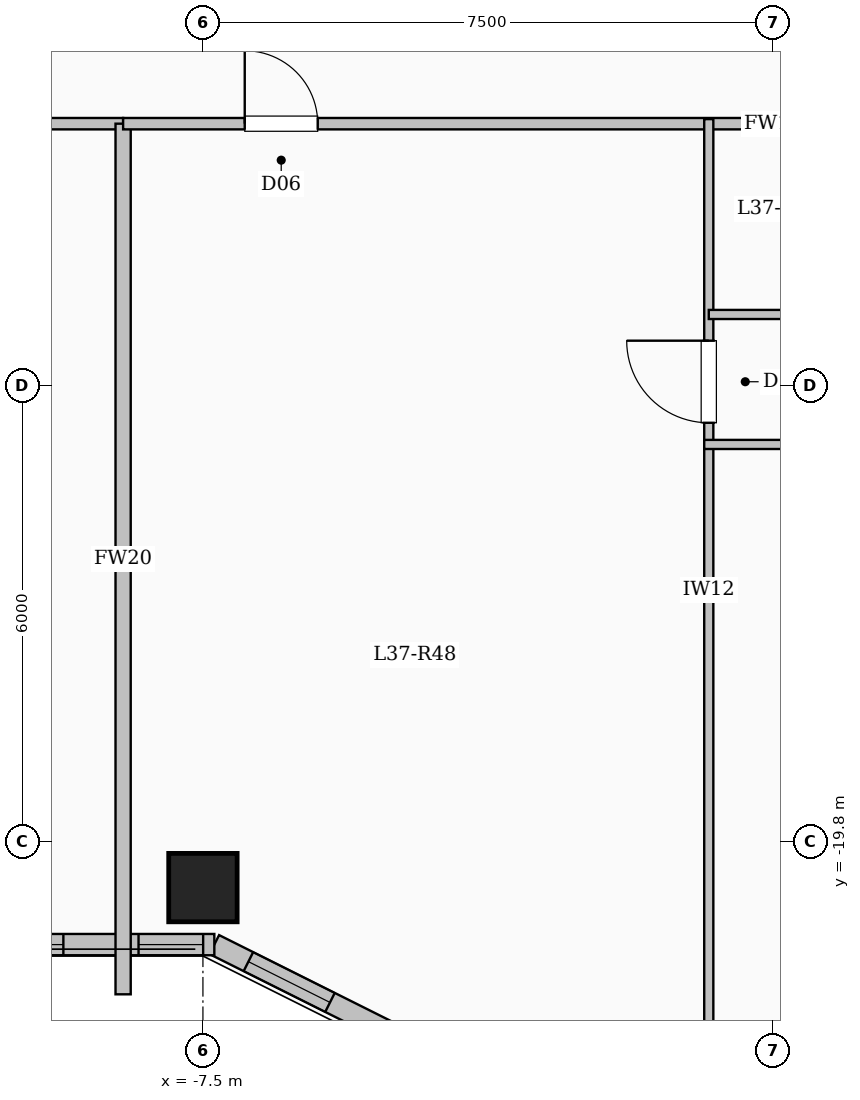
"""IFC4 building model, lengths in metres.
Left out: names, types, materials, properties, quantities, classifications, styles, units other than length and angle.
Written with IfcOpenShell. Run it as: python <this file> out.ifc"""

import sys

from ifc_helpers import new_model, si_unit, direction, frame, frame_2d, origin, origin_2d, place, context, subcontext, project, spatial, rectangle, extrude, element, fill, save


model = new_model("IFC4")
c1 = context("Model", 3, precision=1e-05, world=origin(), true_north=direction((0.0, 1.0)))
c2 = subcontext(c1, "Body", "Model", "MODEL_VIEW")
j1 = project(units=[si_unit("LENGTHUNIT", "METRE"), si_unit("PLANEANGLEUNIT", "RADIAN")], contexts=[c1])
p1 = place(None, origin())
s1 = spatial("IfcSite", under=j1, at=p1, CompositionType="ELEMENT")
p2 = place(p1, origin())
s2 = spatial("IfcBuilding", under=s1, at=p2, CompositionType="ELEMENT")
p3 = place(p2, frame((0.0, 0.0, 139.3)))
s3 = spatial("IfcBuildingStorey", under=s2, at=p3, CompositionType="ELEMENT", Elevation=139.3)
p4 = place(p3, frame((-7.5, -20.4, 0.0), z_axis=(0.0, 0.0, 1.0), x_axis=(1.0, 0.0, 0.0)))
e1 = element("IfcColumn", 1, at=p4, inside=s3, PredefinedType="COLUMN", context=c2, shape_type="SweptSolid", body=[
    extrude(rectangle(XDim=0.9, YDim=0.9, at=origin_2d()), origin(), (0.0, 0.0, 1.0), 3.35),
])
p5 = place(p3, frame((-4.35, -22.65, 0.0), z_axis=(0.0, 0.0, 1.0), x_axis=(-0.894427191, 0.4472135955, 0.0)))
e2 = element("IfcWall", 2, at=p5, inside=s3, PredefinedType="SOLIDWALL", context=c2, shape_type="SweptSolid", body=[
    extrude(rectangle(XDim=3.354, YDim=0.28, at=frame_2d((1.677, 0.0))), origin(), (0.0, 0.0, 1.0), 3.1),
])
p6 = place(p5, frame((1.653, 0.0, 0.95)))
e3 = element("IfcOpeningElement", 3, at=p6, cuts=e2, PredefinedType="OPENING", context=c2, shape_type="SweptSolid", body=[
    extrude(rectangle(XDim=1.2, YDim=1.5, at=frame_2d((0.6, 0.75))), frame((0.0, 0.15, 0.0), z_axis=(0.0, -1.0, 0.0), x_axis=(1.0, 0.0, 0.0)), (0.0, 0.0, 1.0), 0.3),
])
p7 = place(p3, frame((-7.35, -21.15, 0.0), z_axis=(0.0, 0.0, 1.0), x_axis=(-1.0, 0.0, 0.0)))
e4 = element("IfcWall", 4, at=p7, inside=s3, PredefinedType="SOLIDWALL", context=c2, shape_type="SweptSolid", body=[
    extrude(rectangle(XDim=12.3, YDim=0.28, at=frame_2d((6.15, 0.0))), origin(), (0.0, 0.0, 1.0), 3.1),
])
p8 = place(p7, frame((0.147, 0.0, 0.95)))
e5 = element("IfcOpeningElement", 5, at=p8, cuts=e4, PredefinedType="OPENING", context=c2, shape_type="SweptSolid", body=[
    extrude(rectangle(XDim=0.85, YDim=1.5, at=frame_2d((0.425, 0.75))), frame((0.0, 0.15, 0.0), z_axis=(0.0, -1.0, 0.0), x_axis=(1.0, 0.0, 0.0)), (0.0, 0.0, 1.0), 0.3),
])
p9 = place(p7, frame((1.986, 0.0, 0.9)))
e6 = element("IfcOpeningElement", 6, at=p9, cuts=e4, PredefinedType="OPENING", context=c2, shape_type="SweptSolid", body=[
    extrude(rectangle(XDim=1.5, YDim=1.65, at=frame_2d((0.75, 0.825))), frame((0.0, 0.15, 0.0), z_axis=(0.0, -1.0, 0.0), x_axis=(1.0, 0.0, 0.0)), (0.0, 0.0, 1.0), 0.3),
])
p10 = place(p7, frame((5.275, 0.0, 0.9)))
e7 = element("IfcOpeningElement", 7, at=p10, cuts=e4, PredefinedType="OPENING", context=c2, shape_type="SweptSolid", body=[
    extrude(rectangle(XDim=2.0, YDim=1.7, at=frame_2d((1.0, 0.85))), frame((0.0, 0.15, 0.0), z_axis=(0.0, -1.0, 0.0), x_axis=(1.0, 0.0, 0.0)), (0.0, 0.0, 1.0), 0.3),
])
p11 = place(p7, frame((9.267, 0.0, 0.9)))
e8 = element("IfcOpeningElement", 8, at=p11, cuts=e4, PredefinedType="OPENING", context=c2, shape_type="SweptSolid", body=[
    extrude(rectangle(XDim=2.0, YDim=1.7, at=frame_2d((1.0, 0.85))), frame((0.0, 0.15, 0.0), z_axis=(0.0, -1.0, 0.0), x_axis=(1.0, 0.0, 0.0)), (0.0, 0.0, 1.0), 0.3),
])
p12 = place(p3, frame((-19.55, -10.35, 0.0), z_axis=(0.0, 0.0, 1.0), x_axis=(1.0, 0.0, 0.0)))
e9 = element("IfcWall", 9, at=p12, inside=s3, PredefinedType="PARTITIONING", context=c2, shape_type="SweptSolid", body=[
    extrude(rectangle(XDim=11.0, YDim=0.15, at=frame_2d((5.5, 0.0))), origin(), (0.0, 0.0, 1.0), 3.1),
])
p13 = place(p12, frame((1.466, 0.0, 0.0)))
e10 = element("IfcOpeningElement", 10, at=p13, cuts=e9, PredefinedType="OPENING", context=c2, shape_type="SweptSolid", body=[
    extrude(rectangle(XDim=0.95, YDim=2.15, at=frame_2d((0.475, 1.075))), frame((0.0, 0.085, 0.0), z_axis=(0.0, -1.0, 0.0), x_axis=(1.0, 0.0, 0.0)), (0.0, 0.0, 1.0), 0.17),
])
p14 = place(p12, frame((5.438, 0.0, 0.0)))
e11 = element("IfcOpeningElement", 11, at=p14, cuts=e9, PredefinedType="OPENING", context=c2, shape_type="SweptSolid", body=[
    extrude(rectangle(XDim=0.95, YDim=2.15, at=frame_2d((0.475, 1.075))), frame((0.0, 0.085, 0.0), z_axis=(0.0, -1.0, 0.0), x_axis=(1.0, 0.0, 0.0)), (0.0, 0.0, 1.0), 0.17),
])
p15 = place(p12, frame((8.972, 0.0, 0.0)))
e12 = element("IfcOpeningElement", 12, at=p15, cuts=e9, PredefinedType="OPENING", context=c2, shape_type="SweptSolid", body=[
    extrude(rectangle(XDim=0.95, YDim=2.15, at=frame_2d((0.475, 1.075))), frame((0.0, 0.085, 0.0), z_axis=(0.0, -1.0, 0.0), x_axis=(1.0, 0.0, 0.0)), (0.0, 0.0, 1.0), 0.17),
])
p16 = place(p3, frame((-8.55, -21.804, 0.0), z_axis=(0.0, 0.0, 1.0), x_axis=(0.0, 1.0, 0.0)))
e13 = element("IfcWall", 13, at=p16, inside=s3, PredefinedType="SOLIDWALL", context=c2, shape_type="SweptSolid", body=[
    extrude(rectangle(XDim=11.454, YDim=0.2, at=frame_2d((5.727, 0.0))), origin(), (0.0, 0.0, 1.0), 3.1),
])
p17 = place(p3, frame((-8.55, -10.35, 0.0), z_axis=(0.0, 0.0, 1.0), x_axis=(1.0, 0.0, 0.0)))
e14 = element("IfcWall", 14, at=p17, inside=s3, PredefinedType="PARTITIONING", context=c2, shape_type="SweptSolid", body=[
    extrude(rectangle(XDim=17.1, YDim=0.15, at=frame_2d((8.55, 0.0))), origin(), (0.0, 0.0, 1.0), 3.1),
])
p18 = place(p17, frame((1.6, 0.0, 0.0)))
e15 = element("IfcOpeningElement", 15, at=p18, cuts=e14, PredefinedType="OPENING", context=c2, shape_type="SweptSolid", body=[
    extrude(rectangle(XDim=0.96, YDim=2.15, at=frame_2d((0.48, 1.075))), frame((0.0, 0.085, 0.0), z_axis=(0.0, -1.0, 0.0), x_axis=(1.0, 0.0, 0.0)), (0.0, 0.0, 1.0), 0.17),
])
p19 = place(p3, frame((-0.845, -22.68, 0.0), z_axis=(0.0, 0.0, 1.0), x_axis=(0.0, 1.0, 0.0)))
e16 = element("IfcWall", 16, at=p19, inside=s3, PredefinedType="PARTITIONING", context=c2, shape_type="SweptSolid", body=[
    extrude(rectangle(XDim=12.39, YDim=0.12, at=frame_2d((6.195, 0.0))), origin(), (0.0, 0.0, 1.0), 3.1),
])
p20 = place(p19, frame((8.395, 0.0, 0.0)))
e17 = element("IfcOpeningElement", 17, at=p20, cuts=e16, PredefinedType="OPENING", context=c2, shape_type="SweptSolid", body=[
    extrude(rectangle(XDim=1.08, YDim=2.15, at=frame_2d((0.54, 1.075))), frame((0.0, 0.07, 0.0), z_axis=(0.0, -1.0, 0.0), x_axis=(1.0, 0.0, 0.0)), (0.0, 0.0, 1.0), 0.14),
])
p21 = place(p3, frame((-0.845, -12.86, 0.0), z_axis=(0.0, 0.0, 1.0), x_axis=(1.0, 0.0, 0.0)))
e18 = element("IfcWall", 18, at=p21, inside=s3, PredefinedType="PARTITIONING", context=c2, shape_type="SweptSolid", body=[
    extrude(rectangle(XDim=4.942, YDim=0.12, at=frame_2d((2.471, 0.0))), origin(), (0.0, 0.0, 1.0), 3.1),
])
p22 = place(p21, frame((2.031, 0.0, 0.0)))
e19 = element("IfcOpeningElement", 19, at=p22, cuts=e18, PredefinedType="OPENING", context=c2, shape_type="SweptSolid", body=[
    extrude(rectangle(XDim=0.88, YDim=2.1, at=frame_2d((0.44, 1.05))), frame((0.0, 0.07, 0.0), z_axis=(0.0, -1.0, 0.0), x_axis=(1.0, 0.0, 0.0)), (0.0, 0.0, 1.0), 0.14),
])
p23 = place(p3, frame((-0.905, -14.57, 0.0), z_axis=(0.0, 0.0, 1.0), x_axis=(1.0, 0.0, 0.0)))
e20 = element("IfcWall", 20, at=p23, inside=s3, PredefinedType="PARTITIONING", context=c2, shape_type="SweptSolid", body=[
    extrude(rectangle(XDim=9.515, YDim=0.12, at=frame_2d((4.758, 0.0))), origin(), (0.0, 0.0, 1.0), 3.1),
])
p24 = place(p23, frame((1.891, 0.0, 0.0)))
e21 = element("IfcOpeningElement", 21, at=p24, cuts=e20, PredefinedType="OPENING", context=c2, shape_type="SweptSolid", body=[
    extrude(rectangle(XDim=0.88, YDim=2.1, at=frame_2d((0.44, 1.05))), frame((0.0, 0.07, 0.0), z_axis=(0.0, -1.0, 0.0), x_axis=(1.0, 0.0, 0.0)), (0.0, 0.0, 1.0), 0.14),
])
p25 = place(p23, frame((6.554, 0.0, 0.0)))
e22 = element("IfcOpeningElement", 22, at=p25, cuts=e20, PredefinedType="OPENING", context=c2, shape_type="SweptSolid", body=[
    extrude(rectangle(XDim=0.88, YDim=2.1, at=frame_2d((0.44, 1.05))), frame((0.0, 0.07, 0.0), z_axis=(0.0, -1.0, 0.0), x_axis=(1.0, 0.0, 0.0)), (0.0, 0.0, 1.0), 0.14),
])
p26 = place(p6, origin())
e23 = element("IfcWindow", 23, at=p26, inside=s3, PartitioningType="SINGLE_PANEL", PredefinedType="WINDOW", context=c2, shape_type="SweptSolid", body=[
    extrude(rectangle(XDim=1.2, YDim=1.5, at=frame_2d((0.6, 0.75))), frame((0.0, 0.03, 0.0), z_axis=(0.0, -1.0, 0.0), x_axis=(1.0, 0.0, 0.0)), (0.0, 0.0, 1.0), 0.06),
])
fill(e3, e23)
p27 = place(p8, origin())
e24 = element("IfcWindow", 24, at=p27, inside=s3, PartitioningType="SINGLE_PANEL", PredefinedType="WINDOW", context=c2, shape_type="SweptSolid", body=[
    extrude(rectangle(XDim=0.85, YDim=1.5, at=frame_2d((0.425, 0.75))), frame((0.0, 0.03, 0.0), z_axis=(0.0, -1.0, 0.0), x_axis=(1.0, 0.0, 0.0)), (0.0, 0.0, 1.0), 0.06),
])
fill(e5, e24)
p28 = place(p9, origin())
e25 = element("IfcWindow", 25, at=p28, inside=s3, PartitioningType="SINGLE_PANEL", PredefinedType="WINDOW", context=c2, shape_type="SweptSolid", body=[
    extrude(rectangle(XDim=1.5, YDim=1.65, at=frame_2d((0.75, 0.825))), frame((0.0, 0.03, 0.0), z_axis=(0.0, -1.0, 0.0), x_axis=(1.0, 0.0, 0.0)), (0.0, 0.0, 1.0), 0.06),
])
fill(e6, e25)
p29 = place(p18, origin())
e26 = element("IfcDoor", 26, at=p29, inside=s3, OperationType="SINGLE_SWING_LEFT", PredefinedType="DOOR", context=c2, shape_type="SweptSolid", body=[
    extrude(rectangle(XDim=0.96, YDim=2.15, at=frame_2d((0.48, 1.075))), frame((0.0, 0.025, 0.0), z_axis=(0.0, -1.0, 0.0), x_axis=(1.0, 0.0, 0.0)), (0.0, 0.0, 1.0), 0.05),
])
fill(e15, e26)
p30 = place(p20, origin())
e27 = element("IfcDoor", 27, at=p30, inside=s3, OperationType="SINGLE_SWING_RIGHT", PredefinedType="DOOR", context=c2, shape_type="SweptSolid", body=[
    extrude(rectangle(XDim=1.08, YDim=2.15, at=frame_2d((0.54, 1.075))), frame((0.0, 0.025, 0.0), z_axis=(0.0, -1.0, 0.0), x_axis=(1.0, 0.0, 0.0)), (0.0, 0.0, 1.0), 0.05),
])
fill(e17, e27)
save(model, sys.argv[1])
